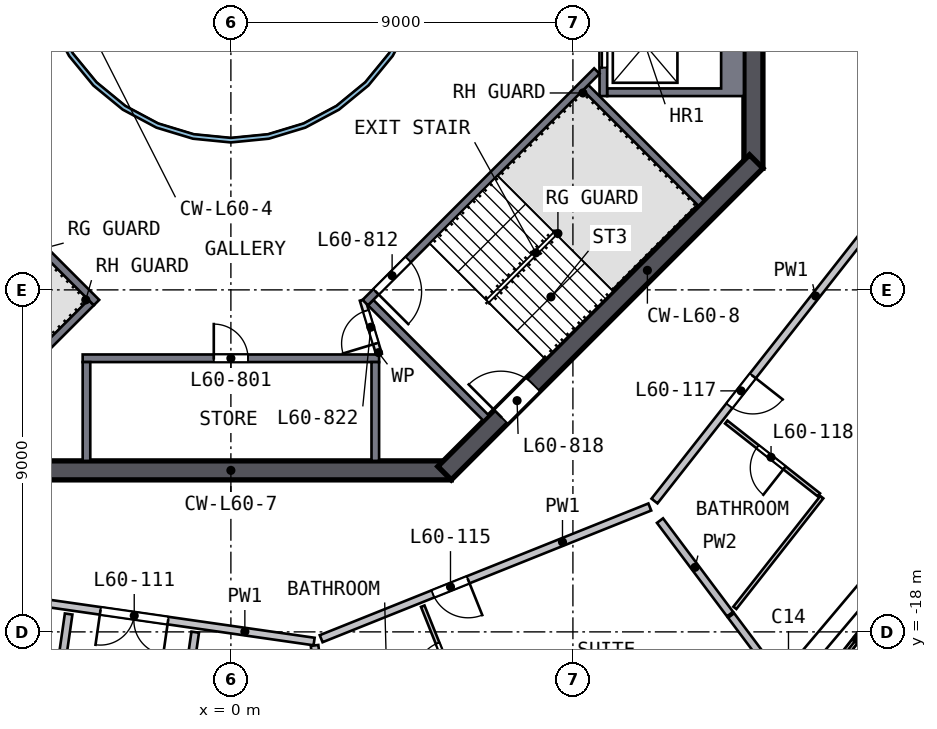
"""IFC4 building model, lengths in metres.
Left out: names, types, materials, properties, quantities, classifications, styles, units other than length and angle.
Written with IfcOpenShell. Run it as: python <this file> out.ifc"""

import sys

from ifc_helpers import new_model, si_unit, direction, frame, frame_2d, origin, place, context, subcontext, project, spatial, polyline, rectangle, outline, extrude, element, fill, save


model = new_model("IFC4")
c1 = context("Model", 3, precision=1e-05, world=origin(), true_north=direction((0.0, 1.0)))
c2 = subcontext(c1, "Body", "Model", "MODEL_VIEW")
j1 = project(units=[si_unit("LENGTHUNIT", "METRE"), si_unit("PLANEANGLEUNIT", "RADIAN")], contexts=[c1])
p1 = place(None, origin())
s1 = spatial("IfcSite", under=j1, at=p1, CompositionType="ELEMENT")
p2 = place(p1, origin())
s2 = spatial("IfcBuilding", under=s1, at=p2, CompositionType="ELEMENT")
p3 = place(p2, frame((0.0, 0.0, 244.5)))
s3 = spatial("IfcBuildingStorey", under=s2, at=p3, CompositionType="ELEMENT", Elevation=244.5)
p4 = place(p3, frame((13.75, -5.799, 0.0), z_axis=(0.0, 0.0, 1.0), x_axis=(0.0, 1.0, 0.0)))
e1 = element("IfcWall", 1, at=p4, inside=s3, PredefinedType="SHEAR", context=c2, shape_type="SweptSolid", body=[
    extrude(rectangle(XDim=11.598, YDim=0.5, at=frame_2d((5.799, 0.0))), origin(), (0.0, 0.0, 1.0), 3.5),
])
p5 = place(p4, frame((4.899, 0.0, 0.0)))
e2 = element("IfcOpeningElement", 2, at=p5, cuts=e1, PredefinedType="OPENING", context=c2, shape_type="SweptSolid", body=[
    extrude(rectangle(XDim=1.8, YDim=2.1, at=frame_2d((0.9, 1.05))), frame((0.0, 0.26, 0.0), z_axis=(0.0, -1.0, 0.0), x_axis=(1.0, 0.0, 0.0)), (0.0, 0.0, 1.0), 0.52),
])
p6 = place(p3, frame((-5.799, -13.75, 0.0), z_axis=(0.0, 0.0, 1.0), x_axis=(1.0, 0.0, 0.0)))
e3 = element("IfcWall", 3, at=p6, inside=s3, PredefinedType="SHEAR", context=c2, shape_type="SweptSolid", body=[
    extrude(rectangle(XDim=11.598, YDim=0.5, at=frame_2d((5.799, 0.0))), origin(), (0.0, 0.0, 1.0), 3.5),
])
p7 = place(p3, frame((5.622, -13.823, 0.0), z_axis=(0.0, 0.0, 1.0), x_axis=(0.707106781, 0.707106781, 0.0)))
e4 = element("IfcWall", 4, at=p7, inside=s3, PredefinedType="SHEAR", context=c2, shape_type="SweptSolid", body=[
    extrude(rectangle(XDim=11.598, YDim=0.5, at=frame_2d((5.799, 0.0))), origin(), (0.0, 0.0, 1.0), 3.5),
])
p8 = place(p7, frame((2.099, 0.0, 0.0)))
e5 = element("IfcOpeningElement", 5, at=p8, cuts=e4, PredefinedType="OPENING", context=c2, shape_type="SweptSolid", body=[
    extrude(rectangle(XDim=1.2, YDim=2.1, at=frame_2d((0.6, 1.05))), frame((0.0, 0.26, 0.0), z_axis=(0.0, -1.0, 0.0), x_axis=(1.0, 0.0, 0.0)), (0.0, 0.0, 1.0), 0.52),
])
p9 = place(p3, frame((15.061, -19.974, 0.0), z_axis=(0.0, 0.0, 1.0), x_axis=(0.617896909, 0.786259124, 0.0)))
e6 = element("IfcWall", 6, at=p9, inside=s3, PredefinedType="SOLIDWALL", context=c2, shape_type="SweptSolid", body=[
    extrude(rectangle(XDim=3.863, YDim=0.15, at=frame_2d((1.932, 0.0))), origin(), (0.0, 0.0, 1.0), 2.525),
])
p10 = place(p9, frame((1.063, 0.0, 0.0)))
e7 = element("IfcOpeningElement", 7, at=p10, cuts=e6, PredefinedType="OPENING", context=c2, shape_type="SweptSolid", body=[
    extrude(rectangle(XDim=2.4, YDim=2.4, at=frame_2d((1.2, 1.2))), frame((0.0, 0.085, 0.0), z_axis=(0.0, -1.0, 0.0), x_axis=(1.0, 0.0, 0.0)), (0.0, 0.0, 1.0), 0.17),
])
p11 = place(p3, origin())
e8 = element("IfcWall", 8, at=p11, inside=s3, PredefinedType="SOLIDWALL", context=c2, shape_type="SweptSolid", body=[
    extrude(outline(polyline([(13.5, -3.9), (9.9, -3.9), (9.9, -3.7), (12.9, -3.7), (12.9, -1.4), (9.9, -1.4), (9.9, -1.2), (13.5, -1.2), (13.5, -3.9)])), origin(), (0.0, 0.0, 1.0), 3.19),
])
p12 = place(p3, frame((9.8, -1.2, 0.0), z_axis=(0.0, 0.0, 1.0), x_axis=(0.0, -1.0, 0.0)))
e9 = element("IfcWall", 9, at=p12, inside=s3, PredefinedType="SOLIDWALL", context=c2, shape_type="SweptSolid", body=[
    extrude(rectangle(XDim=2.7, YDim=0.2, at=frame_2d((1.35, 0.0))), origin(), (0.0, 0.0, 1.0), 3.19),
])
p13 = place(p12, frame((0.75, 0.0, 0.0)))
e10 = element("IfcOpeningElement", 10, at=p13, cuts=e9, PredefinedType="OPENING", context=c2, shape_type="SweptSolid", body=[
    extrude(rectangle(XDim=1.2, YDim=2.1, at=frame_2d((0.6, 1.05))), frame((0.0, 0.11, 0.0), z_axis=(0.0, -1.0, 0.0), x_axis=(1.0, 0.0, 0.0)), (0.0, 0.0, 1.0), 0.22),
])
p14 = place(p3, frame((-3.9, -10.8, 0.0), z_axis=(0.0, 0.0, 1.0), x_axis=(1.0, 0.0, 0.0)))
e11 = element("IfcWall", 11, at=p14, inside=s3, PredefinedType="SOLIDWALL", context=c2, shape_type="SweptSolid", body=[
    extrude(rectangle(XDim=7.8, YDim=0.2, at=frame_2d((3.9, 0.0))), origin(), (0.0, 0.0, 1.0), 3.19),
])
p15 = place(p14, frame((3.45, 0.0, 0.0)))
e12 = element("IfcOpeningElement", 12, at=p15, cuts=e11, PredefinedType="OPENING", context=c2, shape_type="SweptSolid", body=[
    extrude(rectangle(XDim=0.9, YDim=2.1, at=frame_2d((0.45, 1.05))), frame((0.0, 0.11, 0.0), z_axis=(0.0, -1.0, 0.0), x_axis=(1.0, 0.0, 0.0)), (0.0, 0.0, 1.0), 0.22),
])
for number, where, z_axis, x_axis in (
    (13, (-3.8, -10.9, 0.0), (0.0, 0.0, 1.0), (0.0, -1.0, 0.0)),
    (14, (3.8, -10.9, 0.0), (0.0, 0.0, 1.0), (0.0, -1.0, 0.0)),
):
    element("IfcWall", number, at=place(p3, frame(where, z_axis=z_axis, x_axis=x_axis)), inside=s3, PredefinedType="SOLIDWALL", context=c2, shape_type="SweptSolid", body=[
        extrude(rectangle(XDim=2.6, YDim=0.2, at=frame_2d((1.3, 0.0))), origin(), (0.0, 0.0, 1.0), 3.19),
    ])
p16 = place(p3, frame((-3.535, -9.334, 0.0), z_axis=(0.0, 0.0, 1.0), x_axis=(-0.707120946, 0.707092617, 0.0)))
e15 = element("IfcWall", 15, at=p16, inside=s3, PredefinedType="SOLIDWALL", context=c2, shape_type="SweptSolid", body=[
    extrude(rectangle(XDim=8.618, YDim=0.2, at=frame_2d((4.309, 0.0))), origin(), (0.0, 0.0, 1.0), 3.19),
])
p17 = place(p16, frame((6.6, 0.0, 0.0)))
e16 = element("IfcOpeningElement", 16, at=p17, cuts=e15, PredefinedType="OPENING", context=c2, shape_type="SweptSolid", body=[
    extrude(rectangle(XDim=1.2, YDim=2.1, at=frame_2d((0.6, 1.05))), frame((0.0, 0.11, 0.0), z_axis=(0.0, -1.0, 0.0), x_axis=(1.0, 0.0, 0.0)), (0.0, 0.0, 1.0), 0.22),
])
p18 = place(p3, frame((-3.677, -9.334, 0.0), z_axis=(0.0, 0.0, 1.0), x_axis=(-0.707078393, -0.707135168, 0.0)))
e17 = element("IfcWall", 17, at=p18, inside=s3, PredefinedType="SOLIDWALL", context=c2, shape_type="SweptSolid", body=[
    extrude(rectangle(XDim=4.3, YDim=0.2, at=frame_2d((2.15, 0.0))), origin(), (0.0, 0.0, 1.0), 3.19),
])
p19 = place(p3, frame((9.629, -3.24, 0.0), z_axis=(0.0, 0.0, 1.0), x_axis=(-0.707120946, -0.707092617, 0.0)))
e18 = element("IfcWall", 18, at=p19, inside=s3, PredefinedType="SOLIDWALL", context=c2, shape_type="SweptSolid", body=[
    extrude(rectangle(XDim=8.618, YDim=0.2, at=frame_2d((4.309, 0.0))), origin(), (0.0, 0.0, 1.0), 3.19),
])
p20 = place(p19, frame((7.018, 0.0, 0.0)))
e19 = element("IfcOpeningElement", 19, at=p20, cuts=e18, PredefinedType="OPENING", context=c2, shape_type="SweptSolid", body=[
    extrude(rectangle(XDim=1.2, YDim=2.1, at=frame_2d((0.6, 1.05))), frame((0.0, 0.11, 0.0), z_axis=(0.0, -1.0, 0.0), x_axis=(1.0, 0.0, 0.0)), (0.0, 0.0, 1.0), 0.22),
])
for number, where, z_axis, x_axis in (
    (20, (3.677, -9.334, 0.0), (0.0, 0.0, 1.0), (0.707, -0.707, 0.0)),
    (21, (9.334, -3.677, 0.0), (0.0, 0.0, 1.0), (0.707, -0.707, 0.0)),
):
    element("IfcWall", number, at=place(p3, frame(where, z_axis=z_axis, x_axis=x_axis)), inside=s3, PredefinedType="SOLIDWALL", context=c2, shape_type="SweptSolid", body=[
        extrude(rectangle(XDim=4.3, YDim=0.2, at=frame_2d((2.15, 0.0))), origin(), (0.0, 0.0, 1.0), 3.19),
    ])
p21 = place(p3, frame((3.9, -10.7, 0.0), z_axis=(0.0, 0.0, 1.0), x_axis=(-0.289808785, 0.957084567, 0.0)))
e22 = element("IfcWall", 22, at=p21, inside=s3, PredefinedType="PARTITIONING", context=c2, shape_type="SweptSolid", body=[
    extrude(rectangle(XDim=1.501, YDim=0.15, at=frame_2d((0.75, 0.0))), origin(), (0.0, 0.0, 1.0), 3.19),
])
p22 = place(p21, frame((0.301, 0.0, 0.0)))
e23 = element("IfcOpeningElement", 23, at=p22, cuts=e22, PredefinedType="OPENING", context=c2, shape_type="SweptSolid", body=[
    extrude(rectangle(XDim=0.9, YDim=2.1, at=frame_2d((0.45, 1.05))), frame((0.0, 0.085, 0.0), z_axis=(0.0, -1.0, 0.0), x_axis=(1.0, 0.0, 0.0)), (0.0, 0.0, 1.0), 0.17),
])
p23 = place(p3, origin())
e24 = element("IfcWall", 24, at=p23, inside=s3, PredefinedType="SOLIDWALL", context=c2, shape_type="SweptSolid", body=[
    extrude(outline(polyline([(5.021, -0.999), (4.73, -1.959), (4.257, -2.844), (3.62, -3.62), (2.844, -4.257), (1.959, -4.73), (0.999, -5.021), (0.0, -5.12), (-0.999, -5.021), (-1.959, -4.73), (-2.844, -4.257), (-3.62, -3.62), (-4.257, -2.844), (-4.73, -1.959), (-5.021, -0.999), (-5.12, 0.0), (-5.021, 0.999), (-4.73, 1.959), (-4.257, 2.844), (-3.62, 3.62), (-2.844, 4.257), (-1.959, 4.73), (-0.999, 5.021), (0.0, 5.12), (0.999, 5.021), (1.959, 4.73), (2.844, 4.257), (3.62, 3.62), (4.257, 2.844), (4.73, 1.959), (5.021, 0.999), (5.12, 0.0), (5.021, -0.999)]), holes=[polyline([(4.904, 0.976), (4.619, 1.913), (4.157, 2.778), (3.535, 3.535), (2.778, 4.157), (1.913, 4.619), (0.976, 4.904), (0.0, 5.0), (-0.976, 4.904), (-1.913, 4.619), (-2.778, 4.157), (-3.535, 3.535), (-4.157, 2.778), (-4.619, 1.913), (-4.904, 0.976), (-5.0, 0.0), (-4.904, -0.976), (-4.619, -1.913), (-4.157, -2.778), (-3.535, -3.535), (-2.778, -4.157), (-1.913, -4.619), (-0.976, -4.904), (0.0, -5.0), (0.976, -4.904), (1.913, -4.619), (2.778, -4.157), (3.535, -3.535), (4.157, -2.778), (4.619, -1.913), (4.904, -0.976), (5.0, 0.0), (4.904, 0.976)])]), origin(), (0.0, 0.0, 1.0), 3.19),
])
p24 = place(p3, frame((2.19, -18.254, 0.0), z_axis=(0.0, 0.0, 1.0), x_axis=(-0.989873884, 0.141949618, 0.0)))
e25 = element("IfcWall", 25, at=p24, inside=s3, PredefinedType="SOLIDWALL", context=c2, shape_type="SweptSolid", body=[
    extrude(rectangle(XDim=9.317, YDim=0.2, at=frame_2d((4.658, 0.0))), origin(), (0.0, 0.0, 1.0), 3.19),
])
p25 = place(p24, frame((3.881, 0.0, 0.0)))
e26 = element("IfcOpeningElement", 26, at=p25, cuts=e25, PredefinedType="OPENING", context=c2, shape_type="SweptSolid", body=[
    extrude(rectangle(XDim=1.8, YDim=2.1, at=frame_2d((0.9, 1.05))), frame((0.0, 0.11, 0.0), z_axis=(0.0, -1.0, 0.0), x_axis=(1.0, 0.0, 0.0)), (0.0, 0.0, 1.0), 0.22),
])
p26 = place(p3, frame((11.023, -14.714, 0.0), z_axis=(0.0, 0.0, 1.0), x_axis=(-0.928230703, -0.372005055, 0.0)))
e27 = element("IfcWall", 27, at=p26, inside=s3, PredefinedType="SOLIDWALL", context=c2, shape_type="SweptSolid", body=[
    extrude(rectangle(XDim=9.317, YDim=0.2, at=frame_2d((4.658, 0.0))), origin(), (0.0, 0.0, 1.0), 3.19),
])
p27 = place(p26, frame((5.15, 0.0, 0.0)))
e28 = element("IfcOpeningElement", 28, at=p27, cuts=e27, PredefinedType="OPENING", context=c2, shape_type="SweptSolid", body=[
    extrude(rectangle(XDim=1.0, YDim=2.1, at=frame_2d((0.5, 1.05))), frame((0.0, 0.11, 0.0), z_axis=(0.0, -1.0, 0.0), x_axis=(1.0, 0.0, 0.0)), (0.0, 0.0, 1.0), 0.22),
])
p28 = place(p3, frame((16.916, -7.215, 0.0), z_axis=(0.0, 0.0, 1.0), x_axis=(-0.617863125, -0.786285673, 0.0)))
e29 = element("IfcWall", 29, at=p28, inside=s3, PredefinedType="SOLIDWALL", context=c2, shape_type="SweptSolid", body=[
    extrude(rectangle(XDim=9.337, YDim=0.2, at=frame_2d((4.668, 0.0))), origin(), (0.0, 0.0, 1.0), 3.19),
])
p29 = place(p28, frame((5.15, 0.0, 0.0)))
e30 = element("IfcOpeningElement", 30, at=p29, cuts=e29, PredefinedType="OPENING", context=c2, shape_type="SweptSolid", body=[
    extrude(rectangle(XDim=1.0, YDim=2.1, at=frame_2d((0.5, 1.05))), frame((0.0, 0.11, 0.0), z_axis=(0.0, -1.0, 0.0), x_axis=(1.0, 0.0, 0.0)), (0.0, 0.0, 1.0), 0.22),
])
p30 = place(p3, frame((-5.732, -27.728, 0.0), z_axis=(0.0, 0.0, 1.0), x_axis=(0.141952175, 0.989873517, 0.0)))
e31 = element("IfcWall", 31, at=p30, inside=s3, PredefinedType="SOLIDWALL", context=c2, shape_type="SweptSolid", body=[
    extrude(rectangle(XDim=10.302, YDim=0.2, at=frame_2d((5.151, 0.0))), origin(), (0.0, 0.0, 1.0), 3.19),
])
p31 = place(p30, frame((2.5, 0.0, 0.0)))
e32 = element("IfcOpeningElement", 32, at=p31, cuts=e31, PredefinedType="OPENING", context=c2, shape_type="SweptSolid", body=[
    extrude(rectangle(XDim=1.0, YDim=2.1, at=frame_2d((0.5, 1.05))), frame((0.0, 0.11, 0.0), z_axis=(0.0, -1.0, 0.0), x_axis=(1.0, 0.0, 0.0)), (0.0, 0.0, 1.0), 0.22),
])
p32 = place(p3, frame((-0.938, -18.007, 0.0), z_axis=(0.0, 0.0, 1.0), x_axis=(-0.141952175, -0.989873517, 0.0)))
e33 = element("IfcWall", 33, at=p32, inside=s3, PredefinedType="SOLIDWALL", context=c2, shape_type="SweptSolid", body=[
    extrude(rectangle(XDim=10.302, YDim=0.2, at=frame_2d((5.151, 0.0))), origin(), (0.0, 0.0, 1.0), 3.19),
])
p33 = place(p32, frame((2.95, 0.0, 0.0)))
e34 = element("IfcOpeningElement", 34, at=p33, cuts=e33, PredefinedType="OPENING", context=c2, shape_type="SweptSolid", body=[
    extrude(rectangle(XDim=1.0, YDim=2.1, at=frame_2d((0.5, 1.05))), frame((0.0, 0.11, 0.0), z_axis=(0.0, -1.0, 0.0), x_axis=(1.0, 0.0, 0.0)), (0.0, 0.0, 1.0), 0.22),
])
p34 = place(p3, frame((2.202, -18.357, 0.0), z_axis=(0.0, 0.0, 1.0), x_axis=(0.119057916, -0.992887311, 0.0)))
e35 = element("IfcWall", 35, at=p34, inside=s3, PredefinedType="SOLIDWALL", context=c2, shape_type="SweptSolid", body=[
    extrude(rectangle(XDim=3.418, YDim=0.2, at=frame_2d((1.709, 0.0))), origin(), (0.0, 0.0, 1.0), 3.19),
])
p35 = place(p3, frame((11.292, -15.072, 0.0), z_axis=(0.0, 0.0, 1.0), x_axis=(0.599580664, -0.800314331, 0.0)))
e36 = element("IfcWall", 36, at=p35, inside=s3, PredefinedType="SOLIDWALL", context=c2, shape_type="SweptSolid", body=[
    extrude(rectangle(XDim=3.075, YDim=0.2, at=frame_2d((1.537, 0.0))), origin(), (0.0, 0.0, 1.0), 3.19),
])
p36 = place(p3, frame((13.162, -17.569, 0.0), z_axis=(0.0, 0.0, 1.0), x_axis=(0.59962375, -0.800282049, 0.0)))
e37 = element("IfcWall", 37, at=p36, inside=s3, PredefinedType="SOLIDWALL", context=c2, shape_type="SweptSolid", body=[
    extrude(rectangle(XDim=3.011, YDim=0.2, at=frame_2d((1.506, 0.0))), origin(), (0.0, 0.0, 1.0), 3.19),
])
p37 = place(p3, frame((6.202, -20.201, 0.0), z_axis=(0.0, 0.0, 1.0), x_axis=(-0.372042357, 0.928215753, 0.0)))
e38 = element("IfcWall", 38, at=p37, inside=s3, PredefinedType="PARTITIONING", context=c2, shape_type="SweptSolid", body=[
    extrude(rectangle(XDim=3.1, YDim=0.1, at=frame_2d((1.55, 0.0))), origin(), (0.0, 0.0, 1.0), 3.19),
])
p38 = place(p37, frame((1.15, 0.0, 0.0)))
e39 = element("IfcOpeningElement", 39, at=p38, cuts=e38, PredefinedType="OPENING", context=c2, shape_type="SweptSolid", body=[
    extrude(rectangle(XDim=0.9, YDim=2.1, at=frame_2d((0.45, 1.05))), frame((0.0, 0.06, 0.0), z_axis=(0.0, -1.0, 0.0), x_axis=(1.0, 0.0, 0.0)), (0.0, 0.0, 1.0), 0.12),
])
p39 = place(p3, frame((15.471, -14.394, 0.0), z_axis=(0.0, 0.0, 1.0), x_axis=(-0.786301941, 0.617842421, 0.0)))
e40 = element("IfcWall", 40, at=p39, inside=s3, PredefinedType="PARTITIONING", context=c2, shape_type="SweptSolid", body=[
    extrude(rectangle(XDim=3.1, YDim=0.1, at=frame_2d((1.55, 0.0))), origin(), (0.0, 0.0, 1.0), 3.19),
])
p40 = place(p39, frame((1.15, 0.0, 0.0)))
e41 = element("IfcOpeningElement", 41, at=p40, cuts=e40, PredefinedType="OPENING", context=c2, shape_type="SweptSolid", body=[
    extrude(rectangle(XDim=0.9, YDim=2.1, at=frame_2d((0.45, 1.05))), frame((0.0, 0.06, 0.0), z_axis=(0.0, -1.0, 0.0), x_axis=(1.0, 0.0, 0.0)), (0.0, 0.0, 1.0), 0.12),
])
p41 = place(p3, frame((15.55, -14.455, 0.0), z_axis=(0.0, 0.0, 1.0), x_axis=(-0.617798264, -0.786336636, 0.0)))
e42 = element("IfcWall", 42, at=p41, inside=s3, PredefinedType="PARTITIONING", context=c2, shape_type="SweptSolid", body=[
    extrude(rectangle(XDim=3.704, YDim=0.1, at=frame_2d((1.852, 0.0))), origin(), (0.0, 0.0, 1.0), 3.19),
])
p42 = place(p10, origin())
e43 = element("IfcDoor", 43, at=p42, inside=s3, OperationType="SLIDING_TO_LEFT", PredefinedType="DOOR", context=c2, shape_type="SweptSolid", body=[
    extrude(rectangle(XDim=2.4, YDim=2.4, at=frame_2d((1.2, 1.2))), frame((0.0, 0.025, 0.0), z_axis=(0.0, -1.0, 0.0), x_axis=(1.0, 0.0, 0.0)), (0.0, 0.0, 1.0), 0.05),
])
fill(e7, e43)
p43 = place(p15, origin())
e44 = element("IfcDoor", 44, at=p43, inside=s3, OperationType="SINGLE_SWING_LEFT", PredefinedType="DOOR", context=c2, shape_type="SweptSolid", body=[
    extrude(rectangle(XDim=0.9, YDim=2.1, at=frame_2d((0.45, 1.05))), frame((0.0, 0.025, 0.0), z_axis=(0.0, -1.0, 0.0), x_axis=(1.0, 0.0, 0.0)), (0.0, 0.0, 1.0), 0.05),
])
fill(e12, e44)
p44 = place(p13, origin())
e45 = element("IfcDoor", 45, at=p44, inside=s3, OperationType="DOUBLE_DOOR_SLIDING", PredefinedType="DOOR", context=c2, shape_type="SweptSolid", body=[
    extrude(rectangle(XDim=1.2, YDim=2.1, at=frame_2d((0.6, 1.05))), frame((0.0, 0.025, 0.0), z_axis=(0.0, -1.0, 0.0), x_axis=(1.0, 0.0, 0.0)), (0.0, 0.0, 1.0), 0.05),
])
fill(e10, e45)
p45 = place(p20, origin())
e46 = element("IfcDoor", 46, at=p45, inside=s3, OperationType="SINGLE_SWING_RIGHT", PredefinedType="DOOR", context=c2, shape_type="SweptSolid", body=[
    extrude(rectangle(XDim=1.2, YDim=2.1, at=frame_2d((0.6, 1.05))), frame((0.0, 0.025, 0.0), z_axis=(0.0, -1.0, 0.0), x_axis=(1.0, 0.0, 0.0)), (0.0, 0.0, 1.0), 0.05),
])
fill(e19, e46)
p46 = place(p8, origin())
e47 = element("IfcDoor", 47, at=p46, inside=s3, OperationType="SINGLE_SWING_LEFT", PredefinedType="DOOR", context=c2, shape_type="SweptSolid", body=[
    extrude(rectangle(XDim=1.2, YDim=2.1, at=frame_2d((0.6, 1.05))), frame((0.0, 0.025, 0.0), z_axis=(0.0, -1.0, 0.0), x_axis=(1.0, 0.0, 0.0)), (0.0, 0.0, 1.0), 0.05),
])
fill(e5, e47)
p47 = place(p22, origin())
e48 = element("IfcDoor", 48, at=p47, inside=s3, OperationType="SINGLE_SWING_LEFT", PredefinedType="DOOR", context=c2, shape_type="SweptSolid", body=[
    extrude(rectangle(XDim=0.9, YDim=2.1, at=frame_2d((0.45, 1.05))), frame((0.0, 0.025, 0.0), z_axis=(0.0, -1.0, 0.0), x_axis=(1.0, 0.0, 0.0)), (0.0, 0.0, 1.0), 0.05),
])
fill(e23, e48)
p48 = place(p25, origin())
e49 = element("IfcDoor", 49, at=p48, inside=s3, OperationType="DOUBLE_DOOR_SINGLE_SWING", PredefinedType="DOOR", context=c2, shape_type="SweptSolid", body=[
    extrude(rectangle(XDim=1.8, YDim=2.1, at=frame_2d((0.9, 1.05))), frame((0.0, 0.025, 0.0), z_axis=(0.0, -1.0, 0.0), x_axis=(1.0, 0.0, 0.0)), (0.0, 0.0, 1.0), 0.05),
])
fill(e26, e49)
p49 = place(p27, origin())
e50 = element("IfcDoor", 50, at=p49, inside=s3, OperationType="SINGLE_SWING_LEFT", PredefinedType="DOOR", context=c2, shape_type="SweptSolid", body=[
    extrude(rectangle(XDim=1.0, YDim=2.1, at=frame_2d((0.5, 1.05))), frame((0.0, 0.025, 0.0), z_axis=(0.0, -1.0, 0.0), x_axis=(1.0, 0.0, 0.0)), (0.0, 0.0, 1.0), 0.05),
])
fill(e28, e50)
p50 = place(p38, origin())
e51 = element("IfcDoor", 51, at=p50, inside=s3, OperationType="SINGLE_SWING_LEFT", PredefinedType="DOOR", context=c2, shape_type="SweptSolid", body=[
    extrude(rectangle(XDim=0.9, YDim=2.1, at=frame_2d((0.45, 1.05))), frame((0.0, 0.025, 0.0), z_axis=(0.0, -1.0, 0.0), x_axis=(1.0, 0.0, 0.0)), (0.0, 0.0, 1.0), 0.05),
])
fill(e39, e51)
p51 = place(p29, origin())
e52 = element("IfcDoor", 52, at=p51, inside=s3, OperationType="SINGLE_SWING_LEFT", PredefinedType="DOOR", context=c2, shape_type="SweptSolid", body=[
    extrude(rectangle(XDim=1.0, YDim=2.1, at=frame_2d((0.5, 1.05))), frame((0.0, 0.025, 0.0), z_axis=(0.0, -1.0, 0.0), x_axis=(1.0, 0.0, 0.0)), (0.0, 0.0, 1.0), 0.05),
])
fill(e30, e52)
p52 = place(p40, origin())
e53 = element("IfcDoor", 53, at=p52, inside=s3, OperationType="SINGLE_SWING_LEFT", PredefinedType="DOOR", context=c2, shape_type="SweptSolid", body=[
    extrude(rectangle(XDim=0.9, YDim=2.1, at=frame_2d((0.45, 1.05))), frame((0.0, 0.025, 0.0), z_axis=(0.0, -1.0, 0.0), x_axis=(1.0, 0.0, 0.0)), (0.0, 0.0, 1.0), 0.05),
])
fill(e41, e53)
save(model, sys.argv[1])
